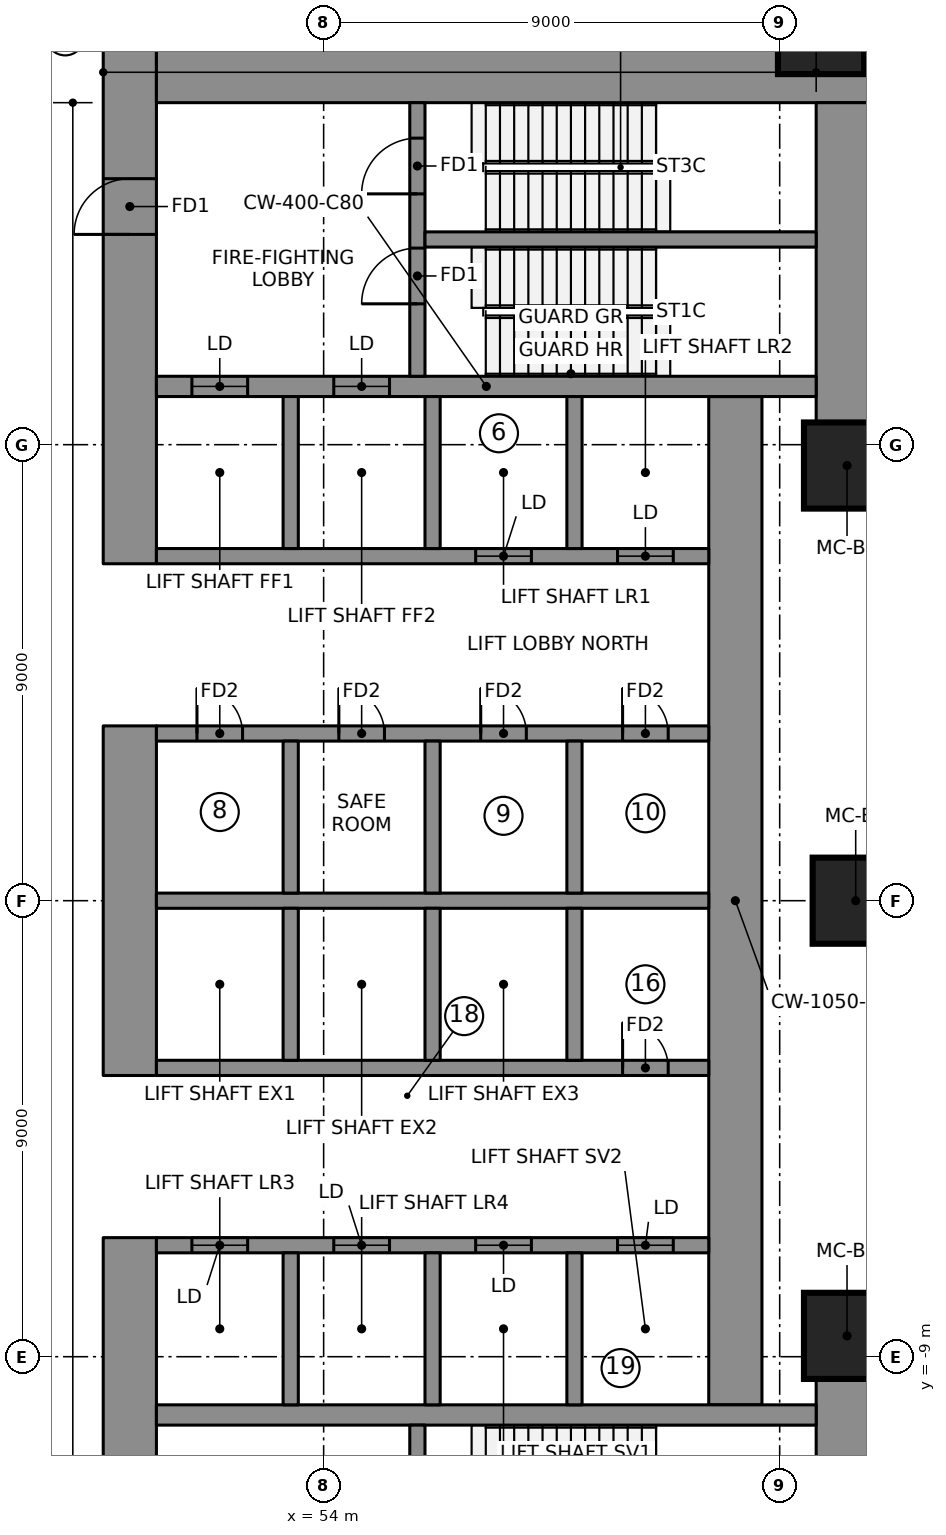
"""IFC4 building model, lengths in metres.
Left out: names, types, materials, properties, quantities, classifications, styles, units other than length and angle.
Written with IfcOpenShell. Run it as: python <this file> out.ifc"""

import sys

from ifc_helpers import new_model, si_unit, direction, frame, frame_2d, origin, origin_2d, place, context, subcontext, project, spatial, rectangle, extrude, element, fill, save


model = new_model("IFC4")
c1 = context("Model", 3, precision=1e-05, world=origin(), true_north=direction((0.0, 1.0)))
c2 = subcontext(c1, "Body", "Model", "MODEL_VIEW")
j1 = project(units=[si_unit("LENGTHUNIT", "METRE"), si_unit("PLANEANGLEUNIT", "RADIAN")], contexts=[c1])
p1 = place(None, origin())
s1 = spatial("IfcSite", under=j1, at=p1, CompositionType="ELEMENT")
p2 = place(p1, origin())
s2 = spatial("IfcBuilding", under=s1, at=p2, CompositionType="ELEMENT")
p3 = place(p2, frame((0.0, 0.0, 80.3)))
s3 = spatial("IfcBuildingStorey", under=s2, at=p3, CompositionType="ELEMENT", Elevation=80.3)
p4 = place(p3, frame((50.175, 6.65, 0.0), z_axis=(0.0, 0.0, 1.0), x_axis=(0.0, 1.0, 0.0)))
e1 = element("IfcWall", 1, at=p4, inside=s3, PredefinedType="SHEAR", context=c2, shape_type="SweptSolid", body=[
    extrude(rectangle(XDim=10.15, YDim=1.05, at=frame_2d((5.075, 0.0))), origin(), (0.0, 0.0, 1.0), 4.6),
])
p5 = place(p4, frame((6.5, 0.0, 0.0)))
e2 = element("IfcOpeningElement", 2, at=p5, cuts=e1, PredefinedType="OPENING", context=c2, shape_type="SweptSolid", body=[
    extrude(rectangle(XDim=1.1, YDim=2.1, at=frame_2d((0.55, 1.05))), frame((0.0, 0.535, 0.0), z_axis=(0.0, -1.0, 0.0), x_axis=(1.0, 0.0, 0.0)), (0.0, 0.0, 1.0), 1.07),
])
p6 = place(p3, frame((50.175, -3.45, 0.0), z_axis=(0.0, 0.0, 1.0), x_axis=(0.0, 1.0, 0.0)))
e3 = element("IfcWall", 3, at=p6, inside=s3, PredefinedType="SHEAR", context=c2, shape_type="SweptSolid", body=[
    extrude(rectangle(XDim=6.9, YDim=1.05, at=frame_2d((3.45, 0.0))), origin(), (0.0, 0.0, 1.0), 4.6),
])
p7 = place(p3, frame((50.175, -16.8, 0.0), z_axis=(0.0, 0.0, 1.0), x_axis=(0.0, 1.0, 0.0)))
e4 = element("IfcWall", 4, at=p7, inside=s3, PredefinedType="SHEAR", context=c2, shape_type="SweptSolid", body=[
    extrude(rectangle(XDim=10.15, YDim=1.05, at=frame_2d((5.075, 0.0))), origin(), (0.0, 0.0, 1.0), 4.6),
])
p8 = place(p7, frame((2.55, 0.0, 0.0)))
e5 = element("IfcOpeningElement", 5, at=p8, cuts=e4, PredefinedType="OPENING", context=c2, shape_type="SweptSolid", body=[
    extrude(rectangle(XDim=1.1, YDim=2.1, at=frame_2d((0.55, 1.05))), frame((0.0, 0.535, 0.0), z_axis=(0.0, -1.0, 0.0), x_axis=(1.0, 0.0, 0.0)), (0.0, 0.0, 1.0), 1.07),
])
p9 = place(p3, frame((50.7, 16.275, 0.0), z_axis=(0.0, 0.0, 1.0), x_axis=(1.0, 0.0, 0.0)))
e6 = element("IfcWall", 6, at=p9, inside=s3, PredefinedType="SHEAR", context=c2, shape_type="SweptSolid", body=[
    extrude(rectangle(XDim=14.07, YDim=1.05, at=frame_2d((7.035, 0.0))), origin(), (0.0, 0.0, 1.0), 4.6),
])
for number, where, z_axis, x_axis in (
    (7, (64.245, 9.389, 0.0), (0.0, 0.0, 1.0), (0.0, 1.0, 0.0)),
    (8, (64.245, -15.75, 0.0), (0.0, 0.0, 1.0), (0.0, 1.0, 0.0)),
):
    element("IfcWall", number, at=place(p3, frame(where, z_axis=z_axis, x_axis=x_axis)), inside=s3, PredefinedType="SHEAR", context=c2, shape_type="SweptSolid", body=[
        extrude(rectangle(XDim=6.361, YDim=1.05, at=frame_2d((3.181, 0.0))), origin(), (0.0, 0.0, 1.0), 4.6),
    ])
p10 = place(p3, frame((62.125, -9.95, 0.0), z_axis=(0.0, 0.0, 1.0), x_axis=(0.0, 1.0, 0.0)))
e9 = element("IfcWall", 9, at=p10, inside=s3, PredefinedType="SHEAR", context=c2, shape_type="SweptSolid", body=[
    extrude(rectangle(XDim=19.9, YDim=1.05, at=frame_2d((9.95, 0.0))), origin(), (0.0, 0.0, 1.0), 4.6),
])
p11 = place(p3, frame((50.7, 10.15, 0.0), z_axis=(0.0, 0.0, 1.0), x_axis=(1.0, 0.0, 0.0)))
e10 = element("IfcWall", 10, at=p11, inside=s3, PredefinedType="SHEAR", context=c2, shape_type="SweptSolid", body=[
    extrude(rectangle(XDim=13.02, YDim=0.4, at=frame_2d((6.51, 0.0))), origin(), (0.0, 0.0, 1.0), 4.6),
])
p12 = place(p11, frame((0.7, 0.0, 0.0)))
e11 = element("IfcOpeningElement", 11, at=p12, cuts=e10, PredefinedType="OPENING", context=c2, shape_type="SweptSolid", body=[
    extrude(rectangle(XDim=1.1, YDim=2.1, at=frame_2d((0.55, 1.05))), frame((0.0, 0.21, 0.0), z_axis=(0.0, -1.0, 0.0), x_axis=(1.0, 0.0, 0.0)), (0.0, 0.0, 1.0), 0.42),
])
p13 = place(p11, frame((3.5, 0.0, 0.0)))
e12 = element("IfcOpeningElement", 12, at=p13, cuts=e10, PredefinedType="OPENING", context=c2, shape_type="SweptSolid", body=[
    extrude(rectangle(XDim=1.1, YDim=2.1, at=frame_2d((0.55, 1.05))), frame((0.0, 0.21, 0.0), z_axis=(0.0, -1.0, 0.0), x_axis=(1.0, 0.0, 0.0)), (0.0, 0.0, 1.0), 0.42),
])
p14 = place(p3, frame((50.7, -10.15, 0.0), z_axis=(0.0, 0.0, 1.0), x_axis=(1.0, 0.0, 0.0)))
e13 = element("IfcWall", 13, at=p14, inside=s3, PredefinedType="SHEAR", context=c2, shape_type="SweptSolid", body=[
    extrude(rectangle(XDim=13.02, YDim=0.4, at=frame_2d((6.51, 0.0))), origin(), (0.0, 0.0, 1.0), 4.6),
])
p15 = place(p3, frame((50.7, 0.0, 0.0), z_axis=(0.0, 0.0, 1.0), x_axis=(1.0, 0.0, 0.0)))
e14 = element("IfcWall", 14, at=p15, inside=s3, PredefinedType="SHEAR", context=c2, shape_type="SweptSolid", body=[
    extrude(rectangle(XDim=10.9, YDim=0.3, at=frame_2d((5.45, 0.0))), origin(), (0.0, 0.0, 1.0), 4.6),
])
p16 = place(p3, frame((50.7, 3.3, 0.0), z_axis=(0.0, 0.0, 1.0), x_axis=(1.0, 0.0, 0.0)))
e15 = element("IfcWall", 15, at=p16, inside=s3, PredefinedType="SHEAR", context=c2, shape_type="SweptSolid", body=[
    extrude(rectangle(XDim=10.9, YDim=0.3, at=frame_2d((5.45, 0.0))), origin(), (0.0, 0.0, 1.0), 4.6),
])
p17 = place(p16, frame((0.8, 0.0, 0.0)))
e16 = element("IfcOpeningElement", 16, at=p17, cuts=e15, PredefinedType="OPENING", context=c2, shape_type="SweptSolid", body=[
    extrude(rectangle(XDim=0.9, YDim=2.1, at=frame_2d((0.45, 1.05))), frame((0.0, 0.16, 0.0), z_axis=(0.0, -1.0, 0.0), x_axis=(1.0, 0.0, 0.0)), (0.0, 0.0, 1.0), 0.32),
])
p18 = place(p16, frame((3.6, 0.0, 0.0)))
e17 = element("IfcOpeningElement", 17, at=p18, cuts=e15, PredefinedType="OPENING", context=c2, shape_type="SweptSolid", body=[
    extrude(rectangle(XDim=0.9, YDim=2.1, at=frame_2d((0.45, 1.05))), frame((0.0, 0.16, 0.0), z_axis=(0.0, -1.0, 0.0), x_axis=(1.0, 0.0, 0.0)), (0.0, 0.0, 1.0), 0.32),
])
p19 = place(p16, frame((6.4, 0.0, 0.0)))
e18 = element("IfcOpeningElement", 18, at=p19, cuts=e15, PredefinedType="OPENING", context=c2, shape_type="SweptSolid", body=[
    extrude(rectangle(XDim=0.9, YDim=2.1, at=frame_2d((0.45, 1.05))), frame((0.0, 0.16, 0.0), z_axis=(0.0, -1.0, 0.0), x_axis=(1.0, 0.0, 0.0)), (0.0, 0.0, 1.0), 0.32),
])
p20 = place(p16, frame((9.2, 0.0, 0.0)))
e19 = element("IfcOpeningElement", 19, at=p20, cuts=e15, PredefinedType="OPENING", context=c2, shape_type="SweptSolid", body=[
    extrude(rectangle(XDim=0.9, YDim=2.1, at=frame_2d((0.45, 1.05))), frame((0.0, 0.16, 0.0), z_axis=(0.0, -1.0, 0.0), x_axis=(1.0, 0.0, 0.0)), (0.0, 0.0, 1.0), 0.32),
])
p21 = place(p3, frame((50.7, 6.8, 0.0), z_axis=(0.0, 0.0, 1.0), x_axis=(1.0, 0.0, 0.0)))
e20 = element("IfcWall", 20, at=p21, inside=s3, PredefinedType="SHEAR", context=c2, shape_type="SweptSolid", body=[
    extrude(rectangle(XDim=10.9, YDim=0.3, at=frame_2d((5.45, 0.0))), origin(), (0.0, 0.0, 1.0), 4.6),
])
p22 = place(p21, frame((6.3, 0.0, 0.0)))
e21 = element("IfcOpeningElement", 21, at=p22, cuts=e20, PredefinedType="OPENING", context=c2, shape_type="SweptSolid", body=[
    extrude(rectangle(XDim=1.1, YDim=2.1, at=frame_2d((0.55, 1.05))), frame((0.0, 0.16, 0.0), z_axis=(0.0, -1.0, 0.0), x_axis=(1.0, 0.0, 0.0)), (0.0, 0.0, 1.0), 0.32),
])
p23 = place(p21, frame((9.1, 0.0, 0.0)))
e22 = element("IfcOpeningElement", 22, at=p23, cuts=e20, PredefinedType="OPENING", context=c2, shape_type="SweptSolid", body=[
    extrude(rectangle(XDim=1.1, YDim=2.1, at=frame_2d((0.55, 1.05))), frame((0.0, 0.16, 0.0), z_axis=(0.0, -1.0, 0.0), x_axis=(1.0, 0.0, 0.0)), (0.0, 0.0, 1.0), 0.32),
])
for number, where, z_axis, x_axis in (
    (23, (53.35, 0.15, 0.0), (0.0, 0.0, 1.0), (0.0, 1.0, 0.0)),
    (24, (53.35, 6.95, 0.0), (0.0, 0.0, 1.0), (0.0, 1.0, 0.0)),
    (25, (56.15, 0.15, 0.0), (0.0, 0.0, 1.0), (0.0, 1.0, 0.0)),
    (26, (56.15, 6.95, 0.0), (0.0, 0.0, 1.0), (0.0, 1.0, 0.0)),
    (27, (58.95, 0.15, 0.0), (0.0, 0.0, 1.0), (0.0, 1.0, 0.0)),
    (28, (58.95, 6.95, 0.0), (0.0, 0.0, 1.0), (0.0, 1.0, 0.0)),
):
    element("IfcWall", number, at=place(p3, frame(where, z_axis=z_axis, x_axis=x_axis)), inside=s3, PredefinedType="SHEAR", context=c2, shape_type="SweptSolid", body=[
        extrude(rectangle(XDim=3.0, YDim=0.3, at=frame_2d((1.5, 0.0))), origin(), (0.0, 0.0, 1.0), 4.6),
    ])
p24 = place(p3, frame((50.7, -3.3, 0.0), z_axis=(0.0, 0.0, 1.0), x_axis=(1.0, 0.0, 0.0)))
e29 = element("IfcWall", 29, at=p24, inside=s3, PredefinedType="SHEAR", context=c2, shape_type="SweptSolid", body=[
    extrude(rectangle(XDim=10.9, YDim=0.3, at=frame_2d((5.45, 0.0))), origin(), (0.0, 0.0, 1.0), 4.6),
])
p25 = place(p24, frame((9.2, 0.0, 0.0)))
e30 = element("IfcOpeningElement", 30, at=p25, cuts=e29, PredefinedType="OPENING", context=c2, shape_type="SweptSolid", body=[
    extrude(rectangle(XDim=0.9, YDim=2.1, at=frame_2d((0.45, 1.05))), frame((0.0, 0.16, 0.0), z_axis=(0.0, -1.0, 0.0), x_axis=(1.0, 0.0, 0.0)), (0.0, 0.0, 1.0), 0.32),
])
p26 = place(p3, frame((50.7, -6.8, 0.0), z_axis=(0.0, 0.0, 1.0), x_axis=(1.0, 0.0, 0.0)))
e31 = element("IfcWall", 31, at=p26, inside=s3, PredefinedType="SHEAR", context=c2, shape_type="SweptSolid", body=[
    extrude(rectangle(XDim=10.9, YDim=0.3, at=frame_2d((5.45, 0.0))), origin(), (0.0, 0.0, 1.0), 4.6),
])
p27 = place(p26, frame((0.7, 0.0, 0.0)))
e32 = element("IfcOpeningElement", 32, at=p27, cuts=e31, PredefinedType="OPENING", context=c2, shape_type="SweptSolid", body=[
    extrude(rectangle(XDim=1.1, YDim=2.1, at=frame_2d((0.55, 1.05))), frame((0.0, 0.16, 0.0), z_axis=(0.0, -1.0, 0.0), x_axis=(1.0, 0.0, 0.0)), (0.0, 0.0, 1.0), 0.32),
])
p28 = place(p26, frame((3.5, 0.0, 0.0)))
e33 = element("IfcOpeningElement", 33, at=p28, cuts=e31, PredefinedType="OPENING", context=c2, shape_type="SweptSolid", body=[
    extrude(rectangle(XDim=1.1, YDim=2.1, at=frame_2d((0.55, 1.05))), frame((0.0, 0.16, 0.0), z_axis=(0.0, -1.0, 0.0), x_axis=(1.0, 0.0, 0.0)), (0.0, 0.0, 1.0), 0.32),
])
p29 = place(p26, frame((6.3, 0.0, 0.0)))
e34 = element("IfcOpeningElement", 34, at=p29, cuts=e31, PredefinedType="OPENING", context=c2, shape_type="SweptSolid", body=[
    extrude(rectangle(XDim=1.1, YDim=2.1, at=frame_2d((0.55, 1.05))), frame((0.0, 0.16, 0.0), z_axis=(0.0, -1.0, 0.0), x_axis=(1.0, 0.0, 0.0)), (0.0, 0.0, 1.0), 0.32),
])
p30 = place(p26, frame((9.1, 0.0, 0.0)))
e35 = element("IfcOpeningElement", 35, at=p30, cuts=e31, PredefinedType="OPENING", context=c2, shape_type="SweptSolid", body=[
    extrude(rectangle(XDim=1.1, YDim=2.1, at=frame_2d((0.55, 1.05))), frame((0.0, 0.16, 0.0), z_axis=(0.0, -1.0, 0.0), x_axis=(1.0, 0.0, 0.0)), (0.0, 0.0, 1.0), 0.32),
])
for number, where, z_axis, x_axis in (
    (36, (53.35, -3.15, 0.0), (0.0, 0.0, 1.0), (0.0, 1.0, 0.0)),
    (37, (53.35, -9.95, 0.0), (0.0, 0.0, 1.0), (0.0, 1.0, 0.0)),
    (38, (56.15, -3.15, 0.0), (0.0, 0.0, 1.0), (0.0, 1.0, 0.0)),
    (39, (56.15, -9.95, 0.0), (0.0, 0.0, 1.0), (0.0, 1.0, 0.0)),
    (40, (58.95, -3.15, 0.0), (0.0, 0.0, 1.0), (0.0, 1.0, 0.0)),
    (41, (58.95, -9.95, 0.0), (0.0, 0.0, 1.0), (0.0, 1.0, 0.0)),
):
    element("IfcWall", number, at=place(p3, frame(where, z_axis=z_axis, x_axis=x_axis)), inside=s3, PredefinedType="SHEAR", context=c2, shape_type="SweptSolid", body=[
        extrude(rectangle(XDim=3.0, YDim=0.3, at=frame_2d((1.5, 0.0))), origin(), (0.0, 0.0, 1.0), 4.6),
    ])
p31 = place(p3, frame((55.85, 10.35, 0.0), z_axis=(0.0, 0.0, 1.0), x_axis=(0.0, 1.0, 0.0)))
e42 = element("IfcWall", 42, at=p31, inside=s3, PredefinedType="SHEAR", context=c2, shape_type="SweptSolid", body=[
    extrude(rectangle(XDim=5.4, YDim=0.3, at=frame_2d((2.7, 0.0))), origin(), (0.0, 0.0, 1.0), 4.6),
])
p32 = place(p31, frame((1.43, 0.0, 0.0)))
e43 = element("IfcOpeningElement", 43, at=p32, cuts=e42, PredefinedType="OPENING", context=c2, shape_type="SweptSolid", body=[
    extrude(rectangle(XDim=1.1, YDim=2.1, at=frame_2d((0.55, 1.05))), frame((0.0, 0.16, 0.0), z_axis=(0.0, -1.0, 0.0), x_axis=(1.0, 0.0, 0.0)), (0.0, 0.0, 1.0), 0.32),
])
p33 = place(p31, frame((3.6, 0.0, 0.0)))
e44 = element("IfcOpeningElement", 44, at=p33, cuts=e42, PredefinedType="OPENING", context=c2, shape_type="SweptSolid", body=[
    extrude(rectangle(XDim=1.1, YDim=2.1, at=frame_2d((0.55, 1.05))), frame((0.0, 0.16, 0.0), z_axis=(0.0, -1.0, 0.0), x_axis=(1.0, 0.0, 0.0)), (0.0, 0.0, 1.0), 0.32),
])
p34 = place(p3, frame((55.85, -15.75, 0.0), z_axis=(0.0, 0.0, 1.0), x_axis=(0.0, 1.0, 0.0)))
e45 = element("IfcWall", 45, at=p34, inside=s3, PredefinedType="SHEAR", context=c2, shape_type="SweptSolid", body=[
    extrude(rectangle(XDim=5.4, YDim=0.3, at=frame_2d((2.7, 0.0))), origin(), (0.0, 0.0, 1.0), 4.6),
])
p35 = place(p34, frame((3.6, 0.0, 0.0)))
e46 = element("IfcOpeningElement", 46, at=p35, cuts=e45, PredefinedType="OPENING", context=c2, shape_type="SweptSolid", body=[
    extrude(rectangle(XDim=1.1, YDim=2.1, at=frame_2d((0.55, 1.05))), frame((0.0, 0.16, 0.0), z_axis=(0.0, -1.0, 0.0), x_axis=(1.0, 0.0, 0.0)), (0.0, 0.0, 1.0), 0.32),
])
p36 = place(p34, frame((0.8, 0.0, 0.0)))
e47 = element("IfcOpeningElement", 47, at=p36, cuts=e45, PredefinedType="OPENING", context=c2, shape_type="SweptSolid", body=[
    extrude(rectangle(XDim=0.9, YDim=2.1, at=frame_2d((0.45, 1.05))), frame((0.0, 0.16, 0.0), z_axis=(0.0, -1.0, 0.0), x_axis=(1.0, 0.0, 0.0)), (0.0, 0.0, 1.0), 0.32),
])
p37 = place(p3, frame((56.0, 13.05, 0.0), z_axis=(0.0, 0.0, 1.0), x_axis=(1.0, 0.0, 0.0)))
e48 = element("IfcWall", 48, at=p37, inside=s3, PredefinedType="SHEAR", context=c2, shape_type="SweptSolid", body=[
    extrude(rectangle(XDim=7.72, YDim=0.3, at=frame_2d((3.86, 0.0))), origin(), (0.0, 0.0, 1.0), 4.6),
])
for number, where, z_axis, x_axis in (
    (49, (64.329, -8.589, 0.0), (0.0, 0.0, 1.0), (1.0, 0.0, 0.0)),
    (50, (64.5, 0.0, 0.0), (0.0, 0.0, 1.0), (1.0, 0.0, 0.0)),
    (51, (64.329, 8.589, 0.0), (0.0, 0.0, 1.0), (1.0, 0.0, 0.0)),
    (52, (63.816, 17.164, 0.0), (0.0, 0.0, 1.0), (1.0, 0.0, 0.0)),
):
    element("IfcColumn", number, at=place(p3, frame(where, z_axis=z_axis, x_axis=x_axis)), inside=s3, PredefinedType="COLUMN", context=c2, shape_type="SweptSolid", body=[
        extrude(rectangle(XDim=1.7, YDim=1.7, at=origin_2d()), origin(), (0.0, 0.0, 1.0), 4.6),
    ])
p38 = place(p12, origin())
e53 = element("IfcDoor", 53, at=p38, inside=s3, OperationType="DOUBLE_DOOR_SLIDING", PredefinedType="DOOR", context=c2, shape_type="SweptSolid", body=[
    extrude(rectangle(XDim=1.1, YDim=2.1, at=frame_2d((0.55, 1.05))), frame((0.0, 0.025, 0.0), z_axis=(0.0, -1.0, 0.0), x_axis=(1.0, 0.0, 0.0)), (0.0, 0.0, 1.0), 0.05),
])
fill(e11, e53)
p39 = place(p13, origin())
e54 = element("IfcDoor", 54, at=p39, inside=s3, OperationType="DOUBLE_DOOR_SLIDING", PredefinedType="DOOR", context=c2, shape_type="SweptSolid", body=[
    extrude(rectangle(XDim=1.1, YDim=2.1, at=frame_2d((0.55, 1.05))), frame((0.0, 0.025, 0.0), z_axis=(0.0, -1.0, 0.0), x_axis=(1.0, 0.0, 0.0)), (0.0, 0.0, 1.0), 0.05),
])
fill(e12, e54)
p40 = place(p22, origin())
e55 = element("IfcDoor", 55, at=p40, inside=s3, OperationType="DOUBLE_DOOR_SLIDING", PredefinedType="DOOR", context=c2, shape_type="SweptSolid", body=[
    extrude(rectangle(XDim=1.1, YDim=2.1, at=frame_2d((0.55, 1.05))), frame((0.0, 0.025, 0.0), z_axis=(0.0, -1.0, 0.0), x_axis=(1.0, 0.0, 0.0)), (0.0, 0.0, 1.0), 0.05),
])
fill(e21, e55)
p41 = place(p23, origin())
e56 = element("IfcDoor", 56, at=p41, inside=s3, OperationType="DOUBLE_DOOR_SLIDING", PredefinedType="DOOR", context=c2, shape_type="SweptSolid", body=[
    extrude(rectangle(XDim=1.1, YDim=2.1, at=frame_2d((0.55, 1.05))), frame((0.0, 0.025, 0.0), z_axis=(0.0, -1.0, 0.0), x_axis=(1.0, 0.0, 0.0)), (0.0, 0.0, 1.0), 0.05),
])
fill(e22, e56)
p42 = place(p27, origin())
e57 = element("IfcDoor", 57, at=p42, inside=s3, OperationType="DOUBLE_DOOR_SLIDING", PredefinedType="DOOR", context=c2, shape_type="SweptSolid", body=[
    extrude(rectangle(XDim=1.1, YDim=2.1, at=frame_2d((0.55, 1.05))), frame((0.0, 0.025, 0.0), z_axis=(0.0, -1.0, 0.0), x_axis=(1.0, 0.0, 0.0)), (0.0, 0.0, 1.0), 0.05),
])
fill(e32, e57)
p43 = place(p28, origin())
e58 = element("IfcDoor", 58, at=p43, inside=s3, OperationType="DOUBLE_DOOR_SLIDING", PredefinedType="DOOR", context=c2, shape_type="SweptSolid", body=[
    extrude(rectangle(XDim=1.1, YDim=2.1, at=frame_2d((0.55, 1.05))), frame((0.0, 0.025, 0.0), z_axis=(0.0, -1.0, 0.0), x_axis=(1.0, 0.0, 0.0)), (0.0, 0.0, 1.0), 0.05),
])
fill(e33, e58)
p44 = place(p29, origin())
e59 = element("IfcDoor", 59, at=p44, inside=s3, OperationType="DOUBLE_DOOR_SLIDING", PredefinedType="DOOR", context=c2, shape_type="SweptSolid", body=[
    extrude(rectangle(XDim=1.1, YDim=2.1, at=frame_2d((0.55, 1.05))), frame((0.0, 0.025, 0.0), z_axis=(0.0, -1.0, 0.0), x_axis=(1.0, 0.0, 0.0)), (0.0, 0.0, 1.0), 0.05),
])
fill(e34, e59)
p45 = place(p30, origin())
e60 = element("IfcDoor", 60, at=p45, inside=s3, OperationType="DOUBLE_DOOR_SLIDING", PredefinedType="DOOR", context=c2, shape_type="SweptSolid", body=[
    extrude(rectangle(XDim=1.1, YDim=2.1, at=frame_2d((0.55, 1.05))), frame((0.0, 0.025, 0.0), z_axis=(0.0, -1.0, 0.0), x_axis=(1.0, 0.0, 0.0)), (0.0, 0.0, 1.0), 0.05),
])
fill(e35, e60)
p46 = place(p32, origin())
e61 = element("IfcDoor", 61, at=p46, inside=s3, OperationType="SINGLE_SWING_RIGHT", PredefinedType="DOOR", context=c2, shape_type="SweptSolid", body=[
    extrude(rectangle(XDim=1.1, YDim=2.1, at=frame_2d((0.55, 1.05))), frame((0.0, 0.025, 0.0), z_axis=(0.0, -1.0, 0.0), x_axis=(1.0, 0.0, 0.0)), (0.0, 0.0, 1.0), 0.05),
])
fill(e43, e61)
p47 = place(p33, origin())
e62 = element("IfcDoor", 62, at=p47, inside=s3, OperationType="SINGLE_SWING_RIGHT", PredefinedType="DOOR", context=c2, shape_type="SweptSolid", body=[
    extrude(rectangle(XDim=1.1, YDim=2.1, at=frame_2d((0.55, 1.05))), frame((0.0, 0.025, 0.0), z_axis=(0.0, -1.0, 0.0), x_axis=(1.0, 0.0, 0.0)), (0.0, 0.0, 1.0), 0.05),
])
fill(e44, e62)
p48 = place(p5, origin())
e63 = element("IfcDoor", 63, at=p48, inside=s3, OperationType="SINGLE_SWING_RIGHT", PredefinedType="DOOR", context=c2, shape_type="SweptSolid", body=[
    extrude(rectangle(XDim=1.1, YDim=2.1, at=frame_2d((0.55, 1.05))), frame((0.0, 0.025, 0.0), z_axis=(0.0, -1.0, 0.0), x_axis=(1.0, 0.0, 0.0)), (0.0, 0.0, 1.0), 0.05),
])
fill(e2, e63)
p49 = place(p17, origin())
e64 = element("IfcDoor", 64, at=p49, inside=s3, OperationType="SINGLE_SWING_LEFT", PredefinedType="DOOR", context=c2, shape_type="SweptSolid", body=[
    extrude(rectangle(XDim=0.9, YDim=2.1, at=frame_2d((0.45, 1.05))), frame((0.0, 0.025, 0.0), z_axis=(0.0, -1.0, 0.0), x_axis=(1.0, 0.0, 0.0)), (0.0, 0.0, 1.0), 0.05),
])
fill(e16, e64)
p50 = place(p18, origin())
e65 = element("IfcDoor", 65, at=p50, inside=s3, OperationType="SINGLE_SWING_LEFT", PredefinedType="DOOR", context=c2, shape_type="SweptSolid", body=[
    extrude(rectangle(XDim=0.9, YDim=2.1, at=frame_2d((0.45, 1.05))), frame((0.0, 0.025, 0.0), z_axis=(0.0, -1.0, 0.0), x_axis=(1.0, 0.0, 0.0)), (0.0, 0.0, 1.0), 0.05),
])
fill(e17, e65)
p51 = place(p19, origin())
e66 = element("IfcDoor", 66, at=p51, inside=s3, OperationType="SINGLE_SWING_LEFT", PredefinedType="DOOR", context=c2, shape_type="SweptSolid", body=[
    extrude(rectangle(XDim=0.9, YDim=2.1, at=frame_2d((0.45, 1.05))), frame((0.0, 0.025, 0.0), z_axis=(0.0, -1.0, 0.0), x_axis=(1.0, 0.0, 0.0)), (0.0, 0.0, 1.0), 0.05),
])
fill(e18, e66)
p52 = place(p20, origin())
e67 = element("IfcDoor", 67, at=p52, inside=s3, OperationType="SINGLE_SWING_LEFT", PredefinedType="DOOR", context=c2, shape_type="SweptSolid", body=[
    extrude(rectangle(XDim=0.9, YDim=2.1, at=frame_2d((0.45, 1.05))), frame((0.0, 0.025, 0.0), z_axis=(0.0, -1.0, 0.0), x_axis=(1.0, 0.0, 0.0)), (0.0, 0.0, 1.0), 0.05),
])
fill(e19, e67)
p53 = place(p25, origin())
e68 = element("IfcDoor", 68, at=p53, inside=s3, OperationType="SINGLE_SWING_LEFT", PredefinedType="DOOR", context=c2, shape_type="SweptSolid", body=[
    extrude(rectangle(XDim=0.9, YDim=2.1, at=frame_2d((0.45, 1.05))), frame((0.0, 0.025, 0.0), z_axis=(0.0, -1.0, 0.0), x_axis=(1.0, 0.0, 0.0)), (0.0, 0.0, 1.0), 0.05),
])
fill(e30, e68)
save(model, sys.argv[1])
